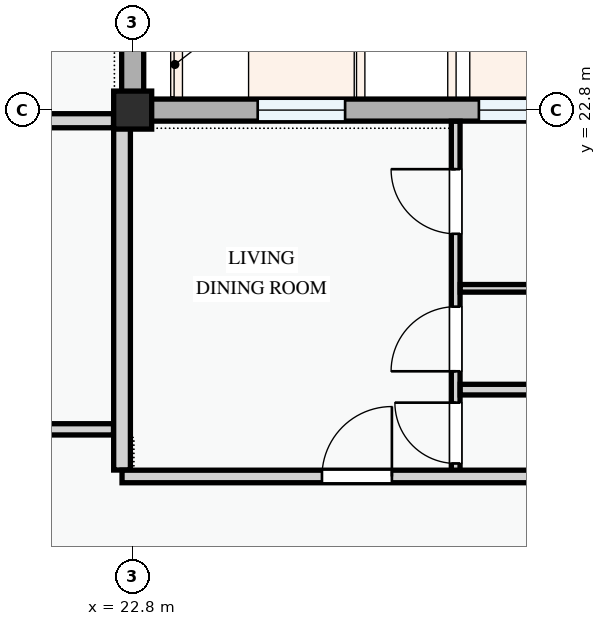
"""IFC4 building model, lengths in metres.
Left out: names, types, materials, properties, quantities, classifications, styles, units other than length and angle.
Written with IfcOpenShell. Run it as: python <this file> out.ifc"""

import sys

from ifc_helpers import new_model, si_unit, direction, frame, frame_2d, origin, origin_2d, place, context, subcontext, project, spatial, rectangle, extrude, element, fill, save


model = new_model("IFC4")
c1 = context("Model", 3, precision=1e-05, world=origin(), true_north=direction((0.0, 1.0)))
c2 = subcontext(c1, "Body", "Model", "MODEL_VIEW")
j1 = project(units=[si_unit("LENGTHUNIT", "METRE"), si_unit("PLANEANGLEUNIT", "RADIAN")], contexts=[c1])
p1 = place(None, origin())
s1 = spatial("IfcSite", under=j1, at=p1, CompositionType="ELEMENT")
p2 = place(p1, origin())
s2 = spatial("IfcBuilding", under=s1, at=p2, CompositionType="ELEMENT")
p3 = place(p2, frame((0.0, 0.0, 21.3)))
s3 = spatial("IfcBuildingStorey", under=s2, at=p3, CompositionType="ELEMENT", Elevation=21.3)
p4 = place(p3, frame((22.8, 22.8, 0.0), z_axis=(0.0, 0.0, 1.0), x_axis=(1.0, 0.0, 0.0)))
e1 = element("IfcColumn", 1, at=p4, inside=s3, PredefinedType="COLUMN", context=c2, shape_type="SweptSolid", body=[
    extrude(rectangle(XDim=0.5, YDim=0.5, at=origin_2d()), origin(), (0.0, 0.0, 1.0), 3.3),
])
p5 = place(p3, frame((22.8, 22.8, 0.0), z_axis=(0.0, 0.0, 1.0), x_axis=(0.0, 1.0, 0.0)))
e2 = element("IfcWall", 2, at=p5, inside=s3, PredefinedType="STANDARD", context=c2, shape_type="SweptSolid", body=[
    extrude(rectangle(XDim=6.0, YDim=0.29, at=frame_2d((3.0, 0.0))), origin(), (0.0, 0.0, 1.0), 2.575),
])
p6 = place(p5, frame((1.745, 0.0, 0.78)))
e3 = element("IfcOpeningElement", 3, at=p6, cuts=e2, PredefinedType="OPENING", context=c2, shape_type="SweptSolid", body=[
    extrude(rectangle(XDim=0.95, YDim=1.15, at=frame_2d((0.475, 0.575))), frame((0.0, 0.155, 0.0), z_axis=(0.0, -1.0, 0.0), x_axis=(1.0, 0.0, 0.0)), (0.0, 0.0, 1.0), 0.31),
])
p7 = place(p5, frame((4.53, 0.0, 0.78)))
e4 = element("IfcOpeningElement", 4, at=p7, cuts=e2, PredefinedType="OPENING", context=c2, shape_type="SweptSolid", body=[
    extrude(rectangle(XDim=1.0, YDim=1.25, at=frame_2d((0.5, 0.625))), frame((0.0, 0.155, 0.0), z_axis=(0.0, -1.0, 0.0), x_axis=(1.0, 0.0, 0.0)), (0.0, 0.0, 1.0), 0.31),
])
p8 = place(p3, frame((28.8, 22.8, 0.0), z_axis=(0.0, 0.0, 1.0), x_axis=(-1.0, 0.0, 0.0)))
e5 = element("IfcWall", 5, at=p8, inside=s3, PredefinedType="STANDARD", context=c2, shape_type="SweptSolid", body=[
    extrude(rectangle(XDim=6.0, YDim=0.29, at=frame_2d((3.0, 0.0))), origin(), (0.0, 0.0, 1.0), 2.475),
])
p9 = place(p8, frame((0.495, 0.0, 0.78)))
e6 = element("IfcOpeningElement", 6, at=p9, cuts=e5, PredefinedType="OPENING", context=c2, shape_type="SweptSolid", body=[
    extrude(rectangle(XDim=0.95, YDim=1.15, at=frame_2d((0.475, 0.575))), frame((0.0, 0.155, 0.0), z_axis=(0.0, -1.0, 0.0), x_axis=(1.0, 0.0, 0.0)), (0.0, 0.0, 1.0), 0.31),
])
p10 = place(p8, frame((3.205, 0.0, 0.78)))
e7 = element("IfcOpeningElement", 7, at=p10, cuts=e5, PredefinedType="OPENING", context=c2, shape_type="SweptSolid", body=[
    extrude(rectangle(XDim=1.15, YDim=1.25, at=frame_2d((0.575, 0.625))), frame((0.0, 0.155, 0.0), z_axis=(0.0, -1.0, 0.0), x_axis=(1.0, 0.0, 0.0)), (0.0, 0.0, 1.0), 0.31),
])
p11 = place(p3, frame((18.025, 18.6, 0.0), z_axis=(0.0, 0.0, 1.0), x_axis=(1.0, 0.0, 0.0)))
e8 = element("IfcWall", 8, at=p11, inside=s3, PredefinedType="PARTITIONING", context=c2, shape_type="SweptSolid", body=[
    extrude(rectangle(XDim=4.523, YDim=0.148, at=frame_2d((2.262, 0.0))), origin(), (0.0, 0.0, 1.0), 3.0),
])
p12 = place(p11, frame((1.65, 0.0, 0.0)))
e9 = element("IfcOpeningElement", 9, at=p12, cuts=e8, PredefinedType="OPENING", context=c2, shape_type="SweptSolid", body=[
    extrude(rectangle(XDim=1.0, YDim=2.15, at=frame_2d((0.5, 1.075))), frame((0.0, 0.084, 0.0), z_axis=(0.0, -1.0, 0.0), x_axis=(1.0, 0.0, 0.0)), (0.0, 0.0, 1.0), 0.168),
])
p13 = place(p3, frame((18.064, 22.66, 0.0), z_axis=(0.0, 0.0, 1.0), x_axis=(1.0, 0.0, 0.0)))
e10 = element("IfcWall", 10, at=p13, inside=s3, PredefinedType="PARTITIONING", context=c2, shape_type="SweptSolid", body=[
    extrude(rectangle(XDim=4.484, YDim=0.185, at=frame_2d((2.242, 0.0))), origin(), (0.0, 0.0, 1.0), 2.375),
])
p14 = place(p3, frame((27.05, 17.98, 0.0), z_axis=(0.0, 0.0, 1.0), x_axis=(0.0, 1.0, 0.0)))
e11 = element("IfcWall", 11, at=p14, inside=s3, PredefinedType="PARTITIONING", context=c2, shape_type="SweptSolid", body=[
    extrude(rectangle(XDim=4.673, YDim=0.115, at=frame_2d((2.336, 0.0))), origin(), (0.0, 0.0, 1.0), 3.0),
])
p15 = place(p14, frame((0.171, 0.0, 0.0)))
e12 = element("IfcOpeningElement", 12, at=p15, cuts=e11, PredefinedType="OPENING", context=c2, shape_type="SweptSolid", body=[
    extrude(rectangle(XDim=0.8, YDim=2.1, at=frame_2d((0.4, 1.05))), frame((0.0, 0.067, 0.0), z_axis=(0.0, -1.0, 0.0), x_axis=(1.0, 0.0, 0.0)), (0.0, 0.0, 1.0), 0.135),
])
p16 = place(p14, frame((1.384, 0.0, 0.0)))
e13 = element("IfcOpeningElement", 13, at=p16, cuts=e11, PredefinedType="OPENING", context=c2, shape_type="SweptSolid", body=[
    extrude(rectangle(XDim=0.85, YDim=2.1, at=frame_2d((0.425, 1.05))), frame((0.0, 0.067, 0.0), z_axis=(0.0, -1.0, 0.0), x_axis=(1.0, 0.0, 0.0)), (0.0, 0.0, 1.0), 0.135),
])
p17 = place(p14, frame((3.193, 0.0, 0.0)))
e14 = element("IfcOpeningElement", 14, at=p17, cuts=e11, PredefinedType="OPENING", context=c2, shape_type="SweptSolid", body=[
    extrude(rectangle(XDim=0.85, YDim=2.1, at=frame_2d((0.425, 1.05))), frame((0.0, 0.067, 0.0), z_axis=(0.0, -1.0, 0.0), x_axis=(1.0, 0.0, 0.0)), (0.0, 0.0, 1.0), 0.135),
])
p18 = place(p3, frame((27.109, 20.455, 0.0), z_axis=(0.0, 0.0, 1.0), x_axis=(1.0, 0.0, 0.0)))
e15 = element("IfcWall", 15, at=p18, inside=s3, PredefinedType="PARTITIONING", context=c2, shape_type="SweptSolid", body=[
    extrude(rectangle(XDim=5.219, YDim=0.1, at=frame_2d((2.609, 0.0))), origin(), (0.0, 0.0, 1.0), 3.0),
])
p19 = place(p3, frame((27.109, 19.122, 0.0), z_axis=(0.0, 0.0, 1.0), x_axis=(1.0, 0.0, 0.0)))
e16 = element("IfcWall", 16, at=p19, inside=s3, PredefinedType="PARTITIONING", context=c2, shape_type="SweptSolid", body=[
    extrude(rectangle(XDim=5.219, YDim=0.14, at=frame_2d((2.609, 0.0))), origin(), (0.0, 0.0, 1.0), 3.0),
])
p20 = place(p3, frame((22.66, 18.064, 0.0), z_axis=(0.0, 0.0, 1.0), x_axis=(0.0, 1.0, 0.0)))
e17 = element("IfcWall", 17, at=p20, inside=s3, PredefinedType="PARTITIONING", context=c2, shape_type="SweptSolid", body=[
    extrude(rectangle(XDim=4.676, YDim=0.22, at=frame_2d((2.338, 0.0))), origin(), (0.0, 0.0, 1.0), 2.425),
])
p21 = place(p3, frame((22.66, 17.98, 0.0), z_axis=(0.0, 0.0, 1.0), x_axis=(1.0, 0.0, 0.0)))
e18 = element("IfcWall", 18, at=p21, inside=s3, PredefinedType="PARTITIONING", context=c2, shape_type="SweptSolid", body=[
    extrude(rectangle(XDim=34.793, YDim=0.165, at=frame_2d((17.396, 0.0))), origin(), (0.0, 0.0, 1.0), 3.0),
])
p22 = place(p21, frame((2.63, 0.0, 0.0)))
e19 = element("IfcOpeningElement", 19, at=p22, cuts=e18, PredefinedType="OPENING", context=c2, shape_type="SweptSolid", body=[
    extrude(rectangle(XDim=0.92, YDim=2.1, at=frame_2d((0.46, 1.05))), frame((0.0, 0.093, 0.0), z_axis=(0.0, -1.0, 0.0), x_axis=(1.0, 0.0, 0.0)), (0.0, 0.0, 1.0), 0.185),
])
p23 = place(p21, frame((10.02, 0.0, 0.0)))
e20 = element("IfcOpeningElement", 20, at=p23, cuts=e18, PredefinedType="OPENING", context=c2, shape_type="SweptSolid", body=[
    extrude(rectangle(XDim=0.96, YDim=2.12, at=frame_2d((0.48, 1.06))), frame((0.0, 0.093, 0.0), z_axis=(0.0, -1.0, 0.0), x_axis=(1.0, 0.0, 0.0)), (0.0, 0.0, 1.0), 0.185),
])
p24 = place(p21, frame((24.289, 0.0, 0.0)))
e21 = element("IfcOpeningElement", 21, at=p24, cuts=e18, PredefinedType="OPENING", context=c2, shape_type="SweptSolid", body=[
    extrude(rectangle(XDim=0.92, YDim=2.1, at=frame_2d((0.46, 1.05))), frame((0.0, 0.093, 0.0), z_axis=(0.0, -1.0, 0.0), x_axis=(1.0, 0.0, 0.0)), (0.0, 0.0, 1.0), 0.185),
])
p25 = place(p9, origin())
e22 = element("IfcWindow", 22, at=p25, inside=s3, PartitioningType="SINGLE_PANEL", PredefinedType="WINDOW", context=c2, shape_type="SweptSolid", body=[
    extrude(rectangle(XDim=0.95, YDim=1.15, at=frame_2d((0.475, 0.575))), frame((0.0, 0.03, 0.0), z_axis=(0.0, -1.0, 0.0), x_axis=(1.0, 0.0, 0.0)), (0.0, 0.0, 1.0), 0.06),
])
fill(e6, e22)
p26 = place(p10, origin())
e23 = element("IfcWindow", 23, at=p26, inside=s3, PartitioningType="SINGLE_PANEL", PredefinedType="WINDOW", context=c2, shape_type="SweptSolid", body=[
    extrude(rectangle(XDim=1.15, YDim=1.25, at=frame_2d((0.575, 0.625))), frame((0.0, 0.03, 0.0), z_axis=(0.0, -1.0, 0.0), x_axis=(1.0, 0.0, 0.0)), (0.0, 0.0, 1.0), 0.06),
])
fill(e7, e23)
p27 = place(p15, origin())
e24 = element("IfcDoor", 24, at=p27, inside=s3, OperationType="SINGLE_SWING_RIGHT", PredefinedType="DOOR", context=c2, shape_type="SweptSolid", body=[
    extrude(rectangle(XDim=0.8, YDim=2.1, at=frame_2d((0.4, 1.05))), frame((0.0, 0.025, 0.0), z_axis=(0.0, -1.0, 0.0), x_axis=(1.0, 0.0, 0.0)), (0.0, 0.0, 1.0), 0.05),
])
fill(e12, e24)
p28 = place(p16, origin())
e25 = element("IfcDoor", 25, at=p28, inside=s3, OperationType="SINGLE_SWING_LEFT", PredefinedType="DOOR", context=c2, shape_type="SweptSolid", body=[
    extrude(rectangle(XDim=0.85, YDim=2.1, at=frame_2d((0.425, 1.05))), frame((0.0, 0.025, 0.0), z_axis=(0.0, -1.0, 0.0), x_axis=(1.0, 0.0, 0.0)), (0.0, 0.0, 1.0), 0.05),
])
fill(e13, e25)
p29 = place(p17, origin())
e26 = element("IfcDoor", 26, at=p29, inside=s3, OperationType="SINGLE_SWING_RIGHT", PredefinedType="DOOR", context=c2, shape_type="SweptSolid", body=[
    extrude(rectangle(XDim=0.85, YDim=2.1, at=frame_2d((0.425, 1.05))), frame((0.0, 0.025, 0.0), z_axis=(0.0, -1.0, 0.0), x_axis=(1.0, 0.0, 0.0)), (0.0, 0.0, 1.0), 0.05),
])
fill(e14, e26)
p30 = place(p22, origin())
e27 = element("IfcDoor", 27, at=p30, inside=s3, OperationType="SINGLE_SWING_RIGHT", PredefinedType="DOOR", context=c2, shape_type="SweptSolid", body=[
    extrude(rectangle(XDim=0.92, YDim=2.1, at=frame_2d((0.46, 1.05))), frame((0.0, 0.025, 0.0), z_axis=(0.0, -1.0, 0.0), x_axis=(1.0, 0.0, 0.0)), (0.0, 0.0, 1.0), 0.05),
])
fill(e19, e27)
save(model, sys.argv[1])
